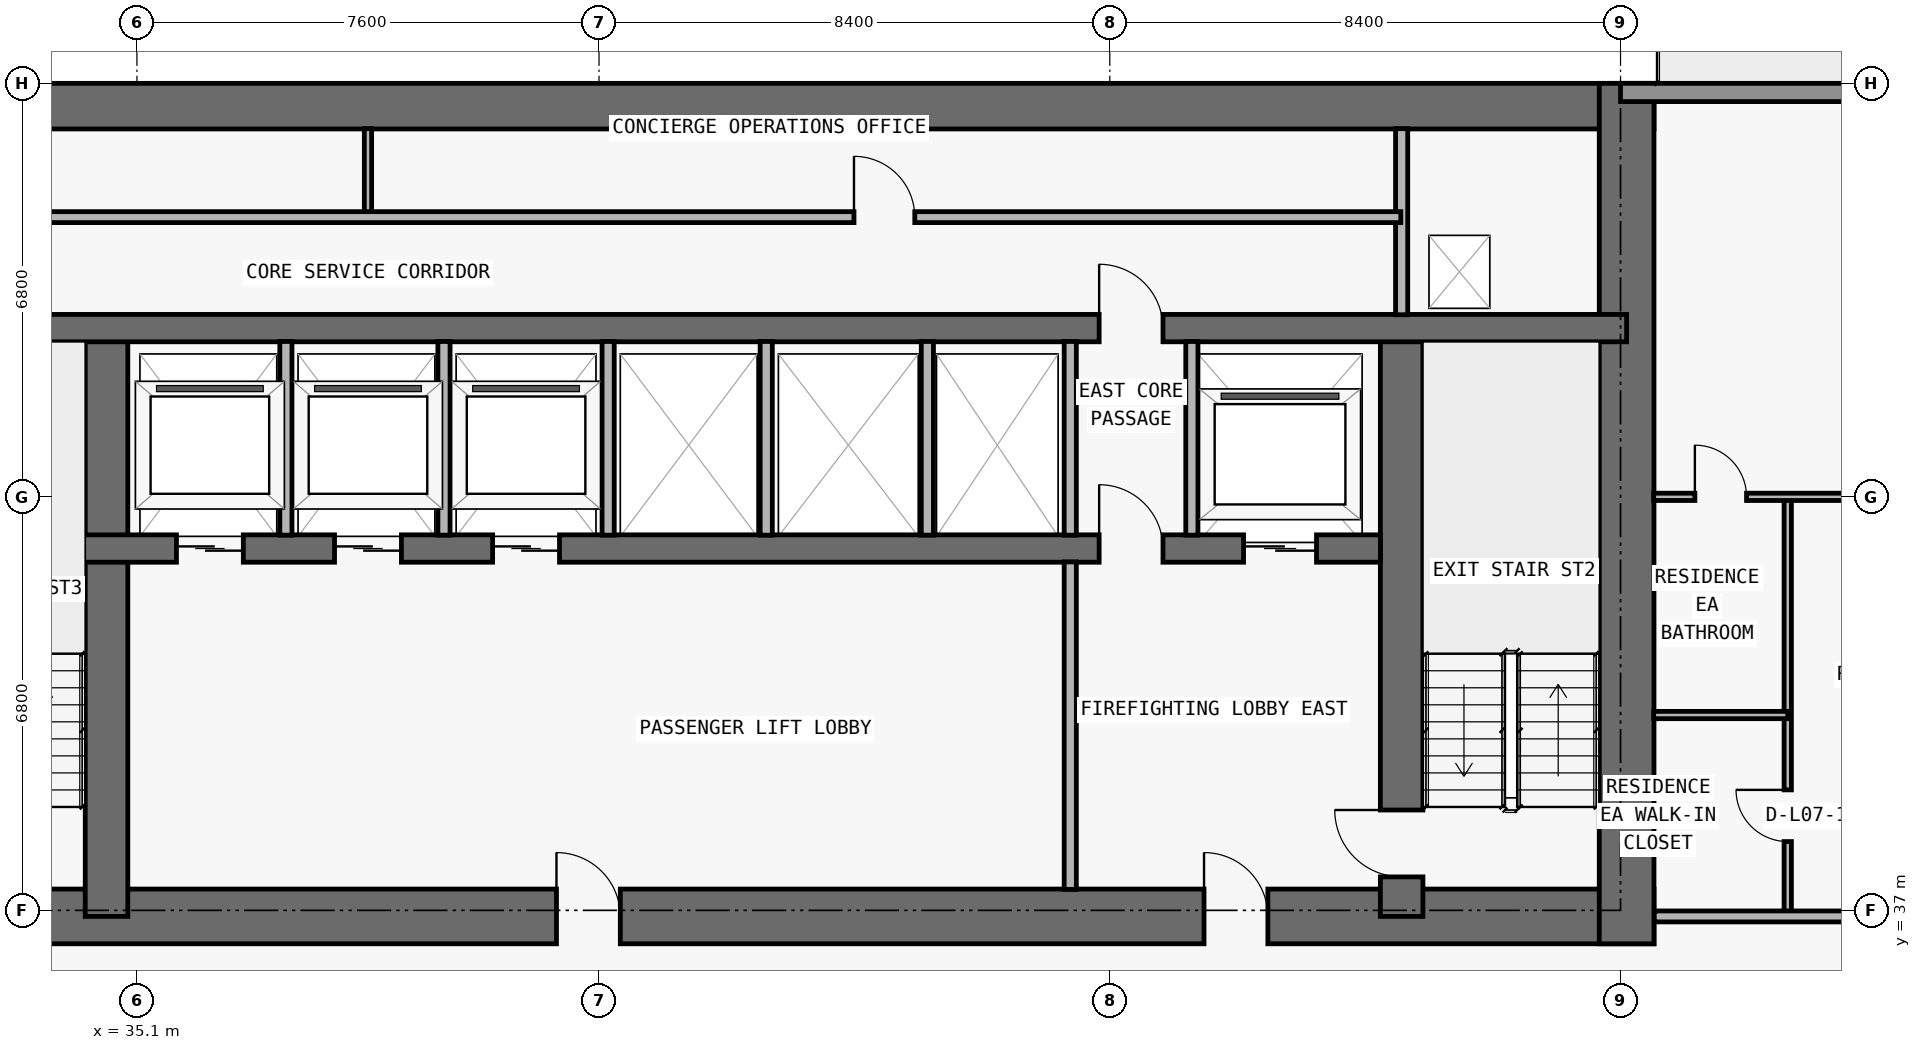
"""IFC4 building model, lengths in metres.
Left out: names, types, materials, properties, quantities, classifications, styles, units other than length and angle.
Written with IfcOpenShell. Run it as: python <this file> out.ifc"""

import sys

from ifc_helpers import new_model, si_unit, direction, frame, frame_2d, origin, place, context, subcontext, project, spatial, rectangle, extrude, element, fill, save


model = new_model("IFC4")
c1 = context("Model", 3, precision=1e-05, world=origin(), true_north=direction((0.0, 1.0)))
c2 = subcontext(c1, "Body", "Model", "MODEL_VIEW")
j1 = project(units=[si_unit("LENGTHUNIT", "METRE"), si_unit("PLANEANGLEUNIT", "RADIAN")], contexts=[c1])
p1 = place(None, origin())
s1 = spatial("IfcSite", under=j1, at=p1, CompositionType="ELEMENT")
p2 = place(p1, origin())
s2 = spatial("IfcBuilding", under=s1, at=p2, CompositionType="ELEMENT")
p3 = place(p2, frame((0.0, 0.0, 33.3)))
s3 = spatial("IfcBuildingStorey", under=s2, at=p3, CompositionType="ELEMENT", Elevation=33.3)
p4 = place(p3, frame((17.75, 36.9, 0.0), z_axis=(0.0, 0.0, 1.0), x_axis=(1.0, 0.0, 0.0)))
e1 = element("IfcWall", 1, at=p4, inside=s3, PredefinedType="SHEAR", context=c2, shape_type="SweptSolid", body=[
    extrude(rectangle(XDim=42.3, YDim=0.9, at=frame_2d((21.15, 0.0))), origin(), (0.0, 0.0, 1.0), 3.05),
])
p5 = place(p4, frame((14.55, 0.0, 0.0)))
e2 = element("IfcOpeningElement", 2, at=p5, cuts=e1, PredefinedType="OPENING", context=c2, shape_type="SweptSolid", body=[
    extrude(rectangle(XDim=1.1, YDim=2.15, at=frame_2d((0.55, 1.075))), frame((0.0, 0.46, 0.0), z_axis=(0.0, -1.0, 0.0), x_axis=(1.0, 0.0, 0.0)), (0.0, 0.0, 1.0), 0.92),
])
p6 = place(p4, frame((6.4, 0.0, 0.0)))
e3 = element("IfcOpeningElement", 3, at=p6, cuts=e1, PredefinedType="OPENING", context=c2, shape_type="SweptSolid", body=[
    extrude(rectangle(XDim=1.05, YDim=2.15, at=frame_2d((0.525, 1.075))), frame((0.0, 0.46, 0.0), z_axis=(0.0, -1.0, 0.0), x_axis=(1.0, 0.0, 0.0)), (0.0, 0.0, 1.0), 0.92),
])
p7 = place(p4, frame((34.9, 0.0, 0.0)))
e4 = element("IfcOpeningElement", 4, at=p7, cuts=e1, PredefinedType="OPENING", context=c2, shape_type="SweptSolid", body=[
    extrude(rectangle(XDim=1.05, YDim=2.15, at=frame_2d((0.525, 1.075))), frame((0.0, 0.46, 0.0), z_axis=(0.0, -1.0, 0.0), x_axis=(1.0, 0.0, 0.0)), (0.0, 0.0, 1.0), 0.92),
])
p8 = place(p4, frame((11.012, 0.0, 0.0)))
e5 = element("IfcOpeningElement", 5, at=p8, cuts=e1, PredefinedType="OPENING", context=c2, shape_type="SweptSolid", body=[
    extrude(rectangle(XDim=1.05, YDim=2.15, at=frame_2d((0.525, 1.075))), frame((0.0, 0.46, 0.0), z_axis=(0.0, -1.0, 0.0), x_axis=(1.0, 0.0, 0.0)), (0.0, 0.0, 1.0), 0.92),
])
p9 = place(p4, frame((24.25, 0.0, 0.0)))
e6 = element("IfcOpeningElement", 6, at=p9, cuts=e1, PredefinedType="OPENING", context=c2, shape_type="SweptSolid", body=[
    extrude(rectangle(XDim=1.05, YDim=2.15, at=frame_2d((0.525, 1.075))), frame((0.0, 0.46, 0.0), z_axis=(0.0, -1.0, 0.0), x_axis=(1.0, 0.0, 0.0)), (0.0, 0.0, 1.0), 0.92),
])
p10 = place(p3, frame((17.75, 50.225, 0.0), z_axis=(0.0, 0.0, 1.0), x_axis=(1.0, 0.0, 0.0)))
e7 = element("IfcWall", 7, at=p10, inside=s3, PredefinedType="SHEAR", context=c2, shape_type="SweptSolid", body=[
    extrude(rectangle(XDim=42.3, YDim=0.75, at=frame_2d((21.15, 0.0))), origin(), (0.0, 0.0, 1.0), 3.05),
])
p11 = place(p3, frame((59.6, 36.45, 0.0), z_axis=(0.0, 0.0, 1.0), x_axis=(0.0, 1.0, 0.0)))
e8 = element("IfcWall", 8, at=p11, inside=s3, PredefinedType="SHEAR", context=c2, shape_type="SweptSolid", body=[
    extrude(rectangle(XDim=14.15, YDim=0.9, at=frame_2d((7.075, 0.0))), origin(), (0.0, 0.0, 1.0), 3.05),
])
p12 = place(p3, frame((55.9, 36.9, 0.0), z_axis=(0.0, 0.0, 1.0), x_axis=(0.0, 1.0, 0.0)))
e9 = element("IfcWall", 9, at=p12, inside=s3, PredefinedType="SHEAR", context=c2, shape_type="SweptSolid", body=[
    extrude(rectangle(XDim=9.675, YDim=0.7, at=frame_2d((4.837, 0.0))), origin(), (0.0, 0.0, 1.0), 3.05),
])
p13 = place(p12, frame((0.65, 0.0, 0.0)))
e10 = element("IfcOpeningElement", 10, at=p13, cuts=e9, PredefinedType="OPENING", context=c2, shape_type="SweptSolid", body=[
    extrude(rectangle(XDim=1.1, YDim=2.15, at=frame_2d((0.55, 1.075))), frame((0.0, 0.36, 0.0), z_axis=(0.0, -1.0, 0.0), x_axis=(1.0, 0.0, 0.0)), (0.0, 0.0, 1.0), 0.72),
])
p14 = place(p3, frame((34.6, 36.9, 0.0), z_axis=(0.0, 0.0, 1.0), x_axis=(0.0, 1.0, 0.0)))
e11 = element("IfcWall", 11, at=p14, inside=s3, PredefinedType="SHEAR", context=c2, shape_type="SweptSolid", body=[
    extrude(rectangle(XDim=9.675, YDim=0.7, at=frame_2d((4.837, 0.0))), origin(), (0.0, 0.0, 1.0), 3.05),
])
p15 = place(p3, frame((22.25, 42.95, 0.0), z_axis=(0.0, 0.0, 1.0), x_axis=(1.0, 0.0, 0.0)))
e12 = element("IfcWall", 12, at=p15, inside=s3, PredefinedType="SHEAR", context=c2, shape_type="SweptSolid", body=[
    extrude(rectangle(XDim=33.3, YDim=0.45, at=frame_2d((16.65, 0.0))), origin(), (0.0, 0.0, 1.0), 3.05),
])
p16 = place(p15, frame((1.05, 0.0, 0.0)))
e13 = element("IfcOpeningElement", 13, at=p16, cuts=e12, PredefinedType="OPENING", context=c2, shape_type="SweptSolid", body=[
    extrude(rectangle(XDim=1.2, YDim=2.2, at=frame_2d((0.6, 1.1))), frame((0.0, 0.235, 0.0), z_axis=(0.0, -1.0, 0.0), x_axis=(1.0, 0.0, 0.0)), (0.0, 0.0, 1.0), 0.47),
])
p17 = place(p15, frame((31.05, 0.0, 0.0)))
e14 = element("IfcOpeningElement", 14, at=p17, cuts=e12, PredefinedType="OPENING", context=c2, shape_type="SweptSolid", body=[
    extrude(rectangle(XDim=1.2, YDim=2.2, at=frame_2d((0.6, 1.1))), frame((0.0, 0.235, 0.0), z_axis=(0.0, -1.0, 0.0), x_axis=(1.0, 0.0, 0.0)), (0.0, 0.0, 1.0), 0.47),
])
p18 = place(p15, frame((13.5, 0.0, 0.0)))
e15 = element("IfcOpeningElement", 15, at=p18, cuts=e12, PredefinedType="OPENING", context=c2, shape_type="SweptSolid", body=[
    extrude(rectangle(XDim=1.1, YDim=2.2, at=frame_2d((0.55, 1.1))), frame((0.0, 0.235, 0.0), z_axis=(0.0, -1.0, 0.0), x_axis=(1.0, 0.0, 0.0)), (0.0, 0.0, 1.0), 0.47),
])
p19 = place(p15, frame((16.1, 0.0, 0.0)))
e16 = element("IfcOpeningElement", 16, at=p19, cuts=e12, PredefinedType="OPENING", context=c2, shape_type="SweptSolid", body=[
    extrude(rectangle(XDim=1.1, YDim=2.2, at=frame_2d((0.55, 1.1))), frame((0.0, 0.235, 0.0), z_axis=(0.0, -1.0, 0.0), x_axis=(1.0, 0.0, 0.0)), (0.0, 0.0, 1.0), 0.47),
])
p20 = place(p15, frame((18.7, 0.0, 0.0)))
e17 = element("IfcOpeningElement", 17, at=p20, cuts=e12, PredefinedType="OPENING", context=c2, shape_type="SweptSolid", body=[
    extrude(rectangle(XDim=1.1, YDim=2.2, at=frame_2d((0.55, 1.1))), frame((0.0, 0.235, 0.0), z_axis=(0.0, -1.0, 0.0), x_axis=(1.0, 0.0, 0.0)), (0.0, 0.0, 1.0), 0.47),
])
p21 = place(p15, frame((3.625, 0.0, 0.0)))
e18 = element("IfcOpeningElement", 18, at=p21, cuts=e12, PredefinedType="OPENING", context=c2, shape_type="SweptSolid", body=[
    extrude(rectangle(XDim=1.05, YDim=2.15, at=frame_2d((0.525, 1.075))), frame((0.0, 0.235, 0.0), z_axis=(0.0, -1.0, 0.0), x_axis=(1.0, 0.0, 0.0)), (0.0, 0.0, 1.0), 0.47),
])
p22 = place(p15, frame((28.675, 0.0, 0.0)))
e19 = element("IfcOpeningElement", 19, at=p22, cuts=e12, PredefinedType="OPENING", context=c2, shape_type="SweptSolid", body=[
    extrude(rectangle(XDim=1.05, YDim=2.15, at=frame_2d((0.525, 1.075))), frame((0.0, 0.235, 0.0), z_axis=(0.0, -1.0, 0.0), x_axis=(1.0, 0.0, 0.0)), (0.0, 0.0, 1.0), 0.47),
])
p23 = place(p3, frame((18.2, 46.575, 0.0), z_axis=(0.0, 0.0, 1.0), x_axis=(1.0, 0.0, 0.0)))
e20 = element("IfcWall", 20, at=p23, inside=s3, PredefinedType="SHEAR", context=c2, shape_type="SweptSolid", body=[
    extrude(rectangle(XDim=41.4, YDim=0.45, at=frame_2d((20.7, 0.0))), origin(), (0.0, 0.0, 1.0), 3.05),
])
p24 = place(p23, frame((7.675, 0.0, 0.0)))
e21 = element("IfcOpeningElement", 21, at=p24, cuts=e20, PredefinedType="OPENING", context=c2, shape_type="SweptSolid", body=[
    extrude(rectangle(XDim=1.05, YDim=2.15, at=frame_2d((0.525, 1.075))), frame((0.0, 0.235, 0.0), z_axis=(0.0, -1.0, 0.0), x_axis=(1.0, 0.0, 0.0)), (0.0, 0.0, 1.0), 0.47),
])
p25 = place(p23, frame((32.725, 0.0, 0.0)))
e22 = element("IfcOpeningElement", 22, at=p25, cuts=e20, PredefinedType="OPENING", context=c2, shape_type="SweptSolid", body=[
    extrude(rectangle(XDim=1.05, YDim=2.15, at=frame_2d((0.525, 1.075))), frame((0.0, 0.235, 0.0), z_axis=(0.0, -1.0, 0.0), x_axis=(1.0, 0.0, 0.0)), (0.0, 0.0, 1.0), 0.47),
])
p26 = place(p3, frame((59.5, 50.45, 0.0), z_axis=(0.0, 0.0, 1.0), x_axis=(1.0, 0.0, 0.0)))
e23 = element("IfcWall", 23, at=p26, inside=s3, PredefinedType="STANDARD", context=c2, shape_type="SweptSolid", body=[
    extrude(rectangle(XDim=13.2, YDim=0.3, at=frame_2d((6.6, 0.0))), origin(), (0.0, 0.0, 1.0), 3.05),
])
p27 = place(p26, frame((5.6, 0.0, 0.0)))
e24 = element("IfcOpeningElement", 24, at=p27, cuts=e23, PredefinedType="OPENING", context=c2, shape_type="SweptSolid", body=[
    extrude(rectangle(XDim=2.0, YDim=2.3, at=frame_2d((1.0, 1.15))), frame((0.0, 0.16, 0.0), z_axis=(0.0, -1.0, 0.0), x_axis=(1.0, 0.0, 0.0)), (0.0, 0.0, 1.0), 0.32),
])
p28 = place(p3, frame((37.55, 43.17, 0.0), z_axis=(0.0, 0.0, 1.0), x_axis=(0.0, 1.0, 0.0)))
e25 = element("IfcWall", 25, at=p28, inside=s3, PredefinedType="PARTITIONING", context=c2, shape_type="SweptSolid", body=[
    extrude(rectangle(XDim=3.185, YDim=0.2, at=frame_2d((1.593, 0.0))), origin(), (0.0, 0.0, 1.0), 3.05),
])
p29 = place(p3, frame((38.9, 48.4, 0.0), z_axis=(0.0, 0.0, 1.0), x_axis=(0.0, 1.0, 0.0)))
e26 = element("IfcWall", 26, at=p29, inside=s3, PredefinedType="PARTITIONING", context=c2, shape_type="SweptSolid", body=[
    extrude(rectangle(XDim=1.455, YDim=0.12, at=frame_2d((0.728, 0.0))), origin(), (0.0, 0.0, 1.0), 3.05),
])
for number, where, z_axis, x_axis in (
    (27, (40.15, 43.17, 0.0), (0.0, 0.0, 1.0), (0.0, 1.0, 0.0)),
    (28, (42.85, 43.17, 0.0), (0.0, 0.0, 1.0), (0.0, 1.0, 0.0)),
    (29, (45.45, 43.17, 0.0), (0.0, 0.0, 1.0), (0.0, 1.0, 0.0)),
    (30, (48.1, 43.17, 0.0), (0.0, 0.0, 1.0), (0.0, 1.0, 0.0)),
):
    element("IfcWall", number, at=place(p3, frame(where, z_axis=z_axis, x_axis=x_axis)), inside=s3, PredefinedType="PARTITIONING", context=c2, shape_type="SweptSolid", body=[
        extrude(rectangle(XDim=3.185, YDim=0.2, at=frame_2d((1.593, 0.0))), origin(), (0.0, 0.0, 1.0), 3.05),
    ])
p30 = place(p3, frame((50.45, 37.345, 0.0), z_axis=(0.0, 0.0, 1.0), x_axis=(0.0, 1.0, 0.0)))
e31 = element("IfcWall", 31, at=p30, inside=s3, PredefinedType="PARTITIONING", context=c2, shape_type="SweptSolid", body=[
    extrude(rectangle(XDim=5.385, YDim=0.2, at=frame_2d((2.692, 0.0))), origin(), (0.0, 0.0, 1.0), 3.05),
])
for number, where, z_axis, x_axis in (
    (32, (50.45, 43.17, 0.0), (0.0, 0.0, 1.0), (0.0, 1.0, 0.0)),
    (33, (52.45, 43.17, 0.0), (0.0, 0.0, 1.0), (0.0, 1.0, 0.0)),
):
    element("IfcWall", number, at=place(p3, frame(where, z_axis=z_axis, x_axis=x_axis)), inside=s3, PredefinedType="PARTITIONING", context=c2, shape_type="SweptSolid", body=[
        extrude(rectangle(XDim=3.185, YDim=0.2, at=frame_2d((1.593, 0.0))), origin(), (0.0, 0.0, 1.0), 3.05),
    ])
p31 = place(p3, frame((55.9, 46.795, 0.0), z_axis=(0.0, 0.0, 1.0), x_axis=(0.0, 1.0, 0.0)))
e34 = element("IfcWall", 34, at=p31, inside=s3, PredefinedType="PARTITIONING", context=c2, shape_type="SweptSolid", body=[
    extrude(rectangle(XDim=3.06, YDim=0.2, at=frame_2d((1.53, 0.0))), origin(), (0.0, 0.0, 1.0), 3.05),
])
p32 = place(p3, frame((62.25, 36.9, 0.0), z_axis=(0.0, 0.0, 1.0), x_axis=(0.0, 1.0, 0.0)))
e35 = element("IfcWall", 35, at=p32, inside=s3, PredefinedType="PARTITIONING", context=c2, shape_type="SweptSolid", body=[
    extrude(rectangle(XDim=6.9, YDim=0.12, at=frame_2d((3.45, 0.0))), origin(), (0.0, 0.0, 1.0), 3.05),
])
p33 = place(p32, frame((1.231, 0.0, 0.0)))
e36 = element("IfcOpeningElement", 36, at=p33, cuts=e35, PredefinedType="OPENING", context=c2, shape_type="SweptSolid", body=[
    extrude(rectangle(XDim=0.85, YDim=2.1, at=frame_2d((0.425, 1.05))), frame((0.0, 0.07, 0.0), z_axis=(0.0, -1.0, 0.0), x_axis=(1.0, 0.0, 0.0)), (0.0, 0.0, 1.0), 0.14),
])
p34 = place(p3, frame((60.055, 36.9, 0.0), z_axis=(0.0, 0.0, 1.0), x_axis=(1.0, 0.0, 0.0)))
e37 = element("IfcWall", 37, at=p34, inside=s3, PredefinedType="PARTITIONING", context=c2, shape_type="SweptSolid", body=[
    extrude(rectangle(XDim=12.645, YDim=0.18, at=frame_2d((6.323, 0.0))), origin(), (0.0, 0.0, 1.0), 3.05),
])
p35 = place(p34, frame((4.52, 0.0, 0.0)))
e38 = element("IfcOpeningElement", 38, at=p35, cuts=e37, PredefinedType="OPENING", context=c2, shape_type="SweptSolid", body=[
    extrude(rectangle(XDim=1.0, YDim=2.2, at=frame_2d((0.5, 1.1))), frame((0.0, 0.1, 0.0), z_axis=(0.0, -1.0, 0.0), x_axis=(1.0, 0.0, 0.0)), (0.0, 0.0, 1.0), 0.2),
])
p36 = place(p3, frame((60.045, 40.212, 0.0), z_axis=(0.0, 0.0, 1.0), x_axis=(1.0, 0.0, 0.0)))
e39 = element("IfcWall", 39, at=p36, inside=s3, PredefinedType="PARTITIONING", context=c2, shape_type="SweptSolid", body=[
    extrude(rectangle(XDim=2.205, YDim=0.12, at=frame_2d((1.103, 0.0))), origin(), (0.0, 0.0, 1.0), 3.05),
])
p37 = place(p3, frame((60.045, 43.8, 0.0), z_axis=(0.0, 0.0, 1.0), x_axis=(1.0, 0.0, 0.0)))
e40 = element("IfcWall", 40, at=p37, inside=s3, PredefinedType="PARTITIONING", context=c2, shape_type="SweptSolid", body=[
    extrude(rectangle(XDim=15.96, YDim=0.12, at=frame_2d((7.98, 0.0))), origin(), (0.0, 0.0, 1.0), 2.339),
])
p38 = place(p37, frame((9.805, 0.0, 0.0)))
e41 = element("IfcOpeningElement", 41, at=p38, cuts=e40, PredefinedType="OPENING", context=c2, shape_type="SweptSolid", body=[
    extrude(rectangle(XDim=0.9, YDim=2.15, at=frame_2d((0.45, 1.075))), frame((0.0, 0.07, 0.0), z_axis=(0.0, -1.0, 0.0), x_axis=(1.0, 0.0, 0.0)), (0.0, 0.0, 1.0), 0.14),
])
p39 = place(p37, frame((4.58, 0.0, 0.0)))
e42 = element("IfcOpeningElement", 42, at=p39, cuts=e40, PredefinedType="OPENING", context=c2, shape_type="SweptSolid", body=[
    extrude(rectangle(XDim=0.9, YDim=2.15, at=frame_2d((0.45, 1.075))), frame((0.0, 0.07, 0.0), z_axis=(0.0, -1.0, 0.0), x_axis=(1.0, 0.0, 0.0)), (0.0, 0.0, 1.0), 0.14),
])
p40 = place(p37, frame((0.677, 0.0, 0.0)))
e43 = element("IfcOpeningElement", 43, at=p40, cuts=e40, PredefinedType="OPENING", context=c2, shape_type="SweptSolid", body=[
    extrude(rectangle(XDim=0.85, YDim=2.1, at=frame_2d((0.425, 1.05))), frame((0.0, 0.07, 0.0), z_axis=(0.0, -1.0, 0.0), x_axis=(1.0, 0.0, 0.0)), (0.0, 0.0, 1.0), 0.14),
])
p41 = place(p3, frame((21.9, 48.4, 0.0), z_axis=(0.0, 0.0, 1.0), x_axis=(1.0, 0.0, 0.0)))
e44 = element("IfcWall", 44, at=p41, inside=s3, PredefinedType="PARTITIONING", context=c2, shape_type="SweptSolid", body=[
    extrude(rectangle(XDim=33.986, YDim=0.18, at=frame_2d((16.993, 0.0))), origin(), (0.0, 0.0, 1.0), 3.05),
])
p42 = place(p41, frame((8.0, 0.0, 0.0)))
e45 = element("IfcOpeningElement", 45, at=p42, cuts=e44, PredefinedType="OPENING", context=c2, shape_type="SweptSolid", body=[
    extrude(rectangle(XDim=1.0, YDim=2.2, at=frame_2d((0.5, 1.1))), frame((0.0, 0.1, 0.0), z_axis=(0.0, -1.0, 0.0), x_axis=(1.0, 0.0, 0.0)), (0.0, 0.0, 1.0), 0.2),
])
p43 = place(p41, frame((24.993, 0.0, 0.0)))
e46 = element("IfcOpeningElement", 46, at=p43, cuts=e44, PredefinedType="OPENING", context=c2, shape_type="SweptSolid", body=[
    extrude(rectangle(XDim=1.0, YDim=2.2, at=frame_2d((0.5, 1.1))), frame((0.0, 0.1, 0.0), z_axis=(0.0, -1.0, 0.0), x_axis=(1.0, 0.0, 0.0)), (0.0, 0.0, 1.0), 0.2),
])
p44 = place(p17, origin())
e47 = element("IfcDoor", 47, at=p44, inside=s3, OperationType="DOUBLE_DOOR_SLIDING", PredefinedType="DOOR", context=c2, shape_type="SweptSolid", body=[
    extrude(rectangle(XDim=1.2, YDim=2.2, at=frame_2d((0.6, 1.1))), frame((0.0, 0.025, 0.0), z_axis=(0.0, -1.0, 0.0), x_axis=(1.0, 0.0, 0.0)), (0.0, 0.0, 1.0), 0.05),
])
fill(e14, e47)
p45 = place(p18, origin())
e48 = element("IfcDoor", 48, at=p45, inside=s3, OperationType="DOUBLE_DOOR_SLIDING", PredefinedType="DOOR", context=c2, shape_type="SweptSolid", body=[
    extrude(rectangle(XDim=1.1, YDim=2.2, at=frame_2d((0.55, 1.1))), frame((0.0, 0.025, 0.0), z_axis=(0.0, -1.0, 0.0), x_axis=(1.0, 0.0, 0.0)), (0.0, 0.0, 1.0), 0.05),
])
fill(e15, e48)
p46 = place(p19, origin())
e49 = element("IfcDoor", 49, at=p46, inside=s3, OperationType="DOUBLE_DOOR_SLIDING", PredefinedType="DOOR", context=c2, shape_type="SweptSolid", body=[
    extrude(rectangle(XDim=1.1, YDim=2.2, at=frame_2d((0.55, 1.1))), frame((0.0, 0.025, 0.0), z_axis=(0.0, -1.0, 0.0), x_axis=(1.0, 0.0, 0.0)), (0.0, 0.0, 1.0), 0.05),
])
fill(e16, e49)
p47 = place(p20, origin())
e50 = element("IfcDoor", 50, at=p47, inside=s3, OperationType="DOUBLE_DOOR_SLIDING", PredefinedType="DOOR", context=c2, shape_type="SweptSolid", body=[
    extrude(rectangle(XDim=1.1, YDim=2.2, at=frame_2d((0.55, 1.1))), frame((0.0, 0.025, 0.0), z_axis=(0.0, -1.0, 0.0), x_axis=(1.0, 0.0, 0.0)), (0.0, 0.0, 1.0), 0.05),
])
fill(e17, e50)
p48 = place(p7, origin())
e51 = element("IfcDoor", 51, at=p48, inside=s3, OperationType="SINGLE_SWING_LEFT", PredefinedType="DOOR", context=c2, shape_type="SweptSolid", body=[
    extrude(rectangle(XDim=1.05, YDim=2.15, at=frame_2d((0.525, 1.075))), frame((0.0, 0.025, 0.0), z_axis=(0.0, -1.0, 0.0), x_axis=(1.0, 0.0, 0.0)), (0.0, 0.0, 1.0), 0.05),
])
fill(e4, e51)
p49 = place(p13, origin())
e52 = element("IfcDoor", 52, at=p49, inside=s3, OperationType="SINGLE_SWING_RIGHT", PredefinedType="DOOR", context=c2, shape_type="SweptSolid", body=[
    extrude(rectangle(XDim=1.1, YDim=2.15, at=frame_2d((0.55, 1.075))), frame((0.0, 0.025, 0.0), z_axis=(0.0, -1.0, 0.0), x_axis=(1.0, 0.0, 0.0)), (0.0, 0.0, 1.0), 0.05),
])
fill(e10, e52)
p50 = place(p22, origin())
e53 = element("IfcDoor", 53, at=p50, inside=s3, OperationType="SINGLE_SWING_LEFT", PredefinedType="DOOR", context=c2, shape_type="SweptSolid", body=[
    extrude(rectangle(XDim=1.05, YDim=2.15, at=frame_2d((0.525, 1.075))), frame((0.0, 0.025, 0.0), z_axis=(0.0, -1.0, 0.0), x_axis=(1.0, 0.0, 0.0)), (0.0, 0.0, 1.0), 0.05),
])
fill(e19, e53)
p51 = place(p9, origin())
e54 = element("IfcDoor", 54, at=p51, inside=s3, OperationType="SINGLE_SWING_LEFT", PredefinedType="DOOR", context=c2, shape_type="SweptSolid", body=[
    extrude(rectangle(XDim=1.05, YDim=2.15, at=frame_2d((0.525, 1.075))), frame((0.0, 0.025, 0.0), z_axis=(0.0, -1.0, 0.0), x_axis=(1.0, 0.0, 0.0)), (0.0, 0.0, 1.0), 0.05),
])
fill(e6, e54)
p52 = place(p25, origin())
e55 = element("IfcDoor", 55, at=p52, inside=s3, OperationType="SINGLE_SWING_LEFT", PredefinedType="DOOR", context=c2, shape_type="SweptSolid", body=[
    extrude(rectangle(XDim=1.05, YDim=2.15, at=frame_2d((0.525, 1.075))), frame((0.0, 0.025, 0.0), z_axis=(0.0, -1.0, 0.0), x_axis=(1.0, 0.0, 0.0)), (0.0, 0.0, 1.0), 0.05),
])
fill(e22, e55)
p53 = place(p43, origin())
e56 = element("IfcDoor", 56, at=p53, inside=s3, OperationType="SINGLE_SWING_LEFT", PredefinedType="DOOR", context=c2, shape_type="SweptSolid", body=[
    extrude(rectangle(XDim=1.0, YDim=2.2, at=frame_2d((0.5, 1.1))), frame((0.0, 0.025, 0.0), z_axis=(0.0, -1.0, 0.0), x_axis=(1.0, 0.0, 0.0)), (0.0, 0.0, 1.0), 0.05),
])
fill(e46, e56)
p54 = place(p33, origin())
e57 = element("IfcDoor", 57, at=p54, inside=s3, OperationType="SINGLE_SWING_RIGHT", PredefinedType="DOOR", context=c2, shape_type="SweptSolid", body=[
    extrude(rectangle(XDim=0.85, YDim=2.1, at=frame_2d((0.425, 1.05))), frame((0.0, 0.025, 0.0), z_axis=(0.0, -1.0, 0.0), x_axis=(1.0, 0.0, 0.0)), (0.0, 0.0, 1.0), 0.05),
])
fill(e36, e57)
p55 = place(p40, origin())
e58 = element("IfcDoor", 58, at=p55, inside=s3, OperationType="SINGLE_SWING_LEFT", PredefinedType="DOOR", context=c2, shape_type="SweptSolid", body=[
    extrude(rectangle(XDim=0.85, YDim=2.1, at=frame_2d((0.425, 1.05))), frame((0.0, 0.025, 0.0), z_axis=(0.0, -1.0, 0.0), x_axis=(1.0, 0.0, 0.0)), (0.0, 0.0, 1.0), 0.05),
])
fill(e43, e58)
save(model, sys.argv[1])
